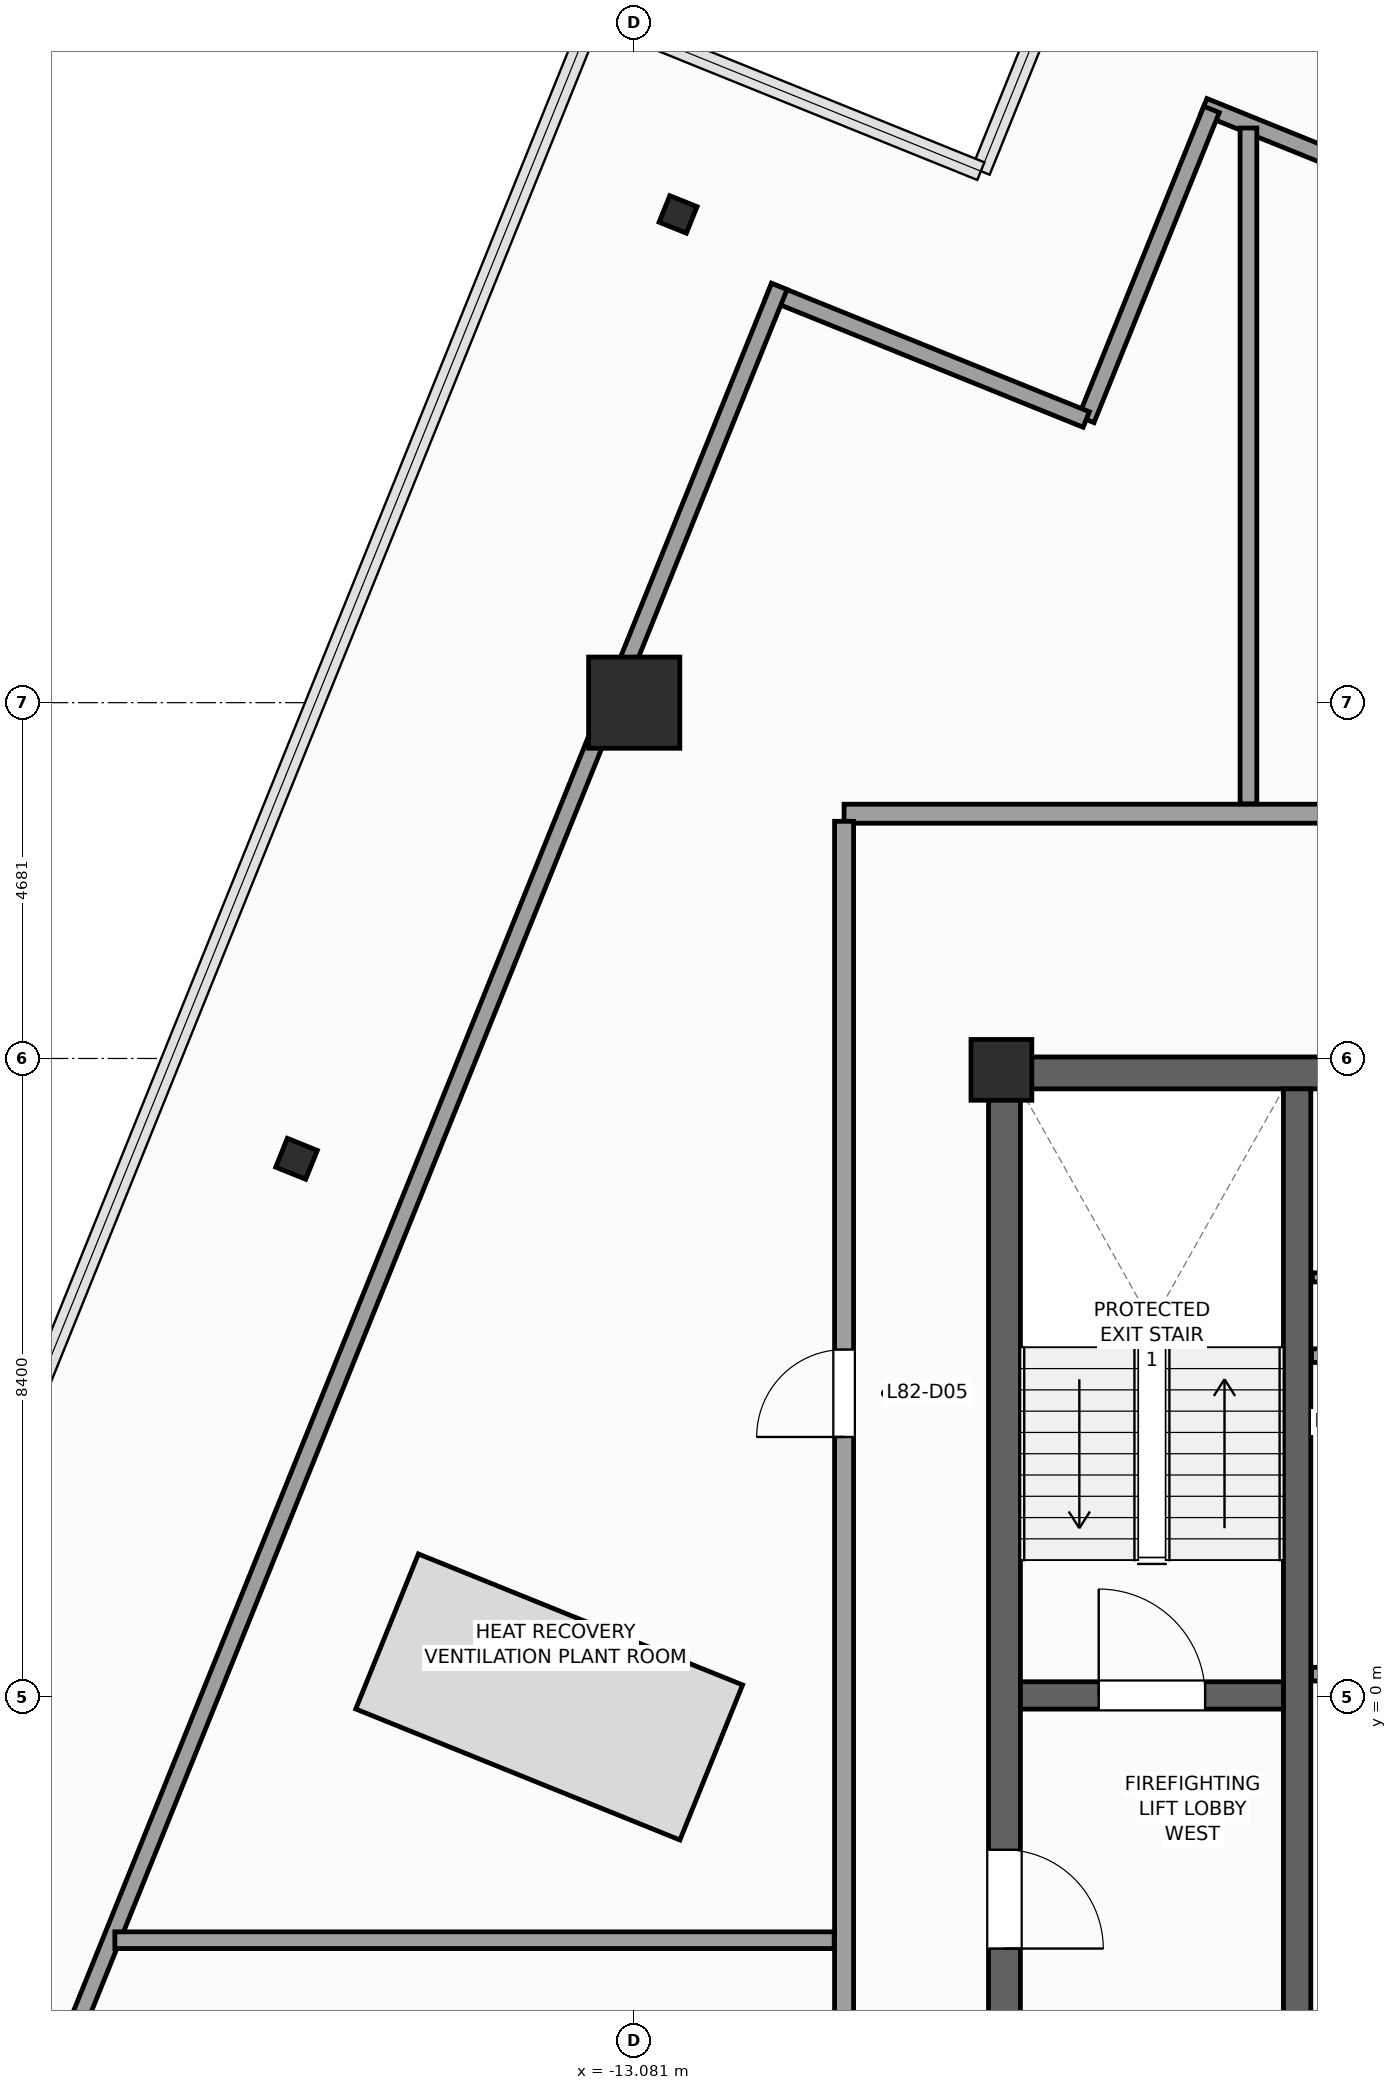
"""IFC4 building model, lengths in metres.
Left out: names, types, materials, properties, quantities, classifications, styles, units other than length and angle.
Written with IfcOpenShell. Run it as: python <this file> out.ifc"""

import sys

from ifc_helpers import new_model, si_unit, direction, frame, frame_2d, origin, origin_2d, place, context, subcontext, project, spatial, rectangle, i_section, extrude, source, transform, mapped, element, fill, save


model = new_model("IFC4")
c1 = context("Model", 3, precision=1e-05, world=origin(), true_north=direction((0.0, 1.0)))
c2 = subcontext(c1, "Body", "Model", "MODEL_VIEW")
j1 = project(units=[si_unit("LENGTHUNIT", "METRE"), si_unit("PLANEANGLEUNIT", "RADIAN")], contexts=[c1])
p1 = place(None, origin())
s1 = spatial("IfcSite", under=j1, at=p1, CompositionType="ELEMENT")
p2 = place(p1, origin())
s2 = spatial("IfcBuilding", under=s1, at=p2, CompositionType="ELEMENT")
p3 = place(p2, frame((0.0, 0.0, 333.6)))
s3 = spatial("IfcBuildingStorey", under=s2, at=p3, CompositionType="ELEMENT", Elevation=333.6)
p4 = place(p3, frame((-8.42, 8.21, 0.0), z_axis=(0.0, 0.0, 1.0), x_axis=(1.0, 0.0, 0.0)))
e1 = element("IfcWall", 1, at=p4, inside=s3, PredefinedType="SHEAR", context=c2, shape_type="SweptSolid", body=[
    extrude(rectangle(XDim=16.84, YDim=0.42, at=frame_2d((8.42, 0.0))), origin(), (0.0, 0.0, 1.0), 4.0),
])
p5 = place(p3, frame((-8.21, -8.0, 0.0), z_axis=(0.0, 0.0, 1.0), x_axis=(0.0, 1.0, 0.0)))
e2 = element("IfcWall", 2, at=p5, inside=s3, PredefinedType="SHEAR", context=c2, shape_type="SweptSolid", body=[
    extrude(rectangle(XDim=16.0, YDim=0.42, at=frame_2d((8.0, 0.0))), origin(), (0.0, 0.0, 1.0), 4.0),
])
p6 = place(p5, frame((4.69, 0.0, 0.0)))
e3 = element("IfcOpeningElement", 3, at=p6, cuts=e2, PredefinedType="OPENING", context=c2, shape_type="SweptSolid", body=[
    extrude(rectangle(XDim=1.3, YDim=2.2, at=frame_2d((0.65, 1.1))), frame((0.0, 0.22, 0.0), z_axis=(0.0, -1.0, 0.0), x_axis=(1.0, 0.0, 0.0)), (0.0, 0.0, 1.0), 0.44),
])
p7 = place(p3, frame((-4.36, -8.0, 0.0), z_axis=(0.0, 0.0, 1.0), x_axis=(0.0, 1.0, 0.0)))
e4 = element("IfcWall", 4, at=p7, inside=s3, PredefinedType="SHEAR", context=c2, shape_type="SweptSolid", body=[
    extrude(rectangle(XDim=16.0, YDim=0.36, at=frame_2d((8.0, 0.0))), origin(), (0.0, 0.0, 1.0), 4.0),
])
p8 = place(p3, frame((-8.0, 0.02, 0.0), z_axis=(0.0, 0.0, 1.0), x_axis=(1.0, 0.0, 0.0)))
e5 = element("IfcWall", 5, at=p8, inside=s3, PredefinedType="SHEAR", context=c2, shape_type="SweptSolid", body=[
    extrude(rectangle(XDim=3.46, YDim=0.36, at=frame_2d((1.73, 0.0))), origin(), (0.0, 0.0, 1.0), 4.0),
])
p9 = place(p8, frame((1.03, 0.0, 0.0)))
e6 = element("IfcOpeningElement", 6, at=p9, cuts=e5, PredefinedType="OPENING", context=c2, shape_type="SweptSolid", body=[
    extrude(rectangle(XDim=1.4, YDim=2.2, at=frame_2d((0.7, 1.1))), frame((0.0, 0.19, 0.0), z_axis=(0.0, -1.0, 0.0), x_axis=(1.0, 0.0, 0.0)), (0.0, 0.0, 1.0), 0.38),
])
m1 = source(origin(), c2, "Body", "SweptSolid", [
    extrude(rectangle(XDim=0.8, YDim=0.8, at=origin_2d()), origin(), (0.0, 0.0, 1.0), 4.0),
])
p10 = place(p3, frame((-8.25, 8.25, 0.0), z_axis=(0.0, 0.0, 1.0), x_axis=(1.0, 0.0, 0.0)))
e7 = element("IfcColumn", 7, at=p10, inside=s3, PredefinedType="PILASTER", context=c2, shape_type="MappedRepresentation", body=[
    mapped(m1, transform((0.0, 0.0, 0.0), scale=1.0)),
])
m2 = source(origin(), c2, "Body", "SweptSolid", [
    extrude(rectangle(XDim=1.2, YDim=1.2, at=origin_2d()), origin(), (0.0, 0.0, 1.0), 4.0),
])
p11 = place(p3, frame((-13.081, 13.081, 0.0), z_axis=(0.0, 0.0, 1.0), x_axis=(1.0, 0.0, 0.0)))
e8 = element("IfcColumn", 8, at=p11, inside=s3, PredefinedType="COLUMN", context=c2, shape_type="MappedRepresentation", body=[
    mapped(m2, transform((0.0, 0.0, 0.0), scale=1.0)),
])
m3 = source(origin(), c2, "Body", "SweptSolid", [
    extrude(i_section(OverallWidth=0.376, OverallDepth=0.387, WebThickness=0.02, FlangeThickness=0.032, FilletRadius=0.015, at=origin_2d()), origin(), (0.0, 0.0, 1.0), 4.0),
])
p12 = place(p3, frame((-12.504, 19.504, 0.0), z_axis=(0.0, 0.0, 1.0), x_axis=(0.374606593416, 0.927183854567, 0.0)))
e9 = element("IfcColumn", 9, at=p12, inside=s3, PredefinedType="COLUMN", context=c2, shape_type="MappedRepresentation", body=[
    mapped(m3, transform((0.0, 0.0, 0.0), scale=1.0)),
])
m4 = source(origin(), c2, "Body", "SweptSolid", [
    extrude(i_section(OverallWidth=0.409, OverallDepth=0.425, WebThickness=0.024, FlangeThickness=0.039, FilletRadius=0.015, at=origin_2d()), origin(), (0.0, 0.0, 1.0), 4.0),
])
p13 = place(p3, frame((-17.524, 7.08, 0.0), z_axis=(0.0, 0.0, 1.0), x_axis=(0.374606593416, 0.927183854567, 0.0)))
e10 = element("IfcColumn", 10, at=p13, inside=s3, PredefinedType="COLUMN", context=c2, shape_type="MappedRepresentation", body=[
    mapped(m4, transform((0.0, 0.0, 0.0), scale=1.0)),
])
for number, where, z_axis, x_axis in (
    (11, (-4.17, 0.3, 0.0), (0.0, 0.0, 1.0), (1.0, 0.0, 0.0)),
    (12, (-4.17, 4.49, 0.0), (0.0, 0.0, 1.0), (1.0, 0.0, 0.0)),
):
    element("IfcWall", number, at=place(p3, frame(where, z_axis=z_axis, x_axis=x_axis)), inside=s3, PredefinedType="PARTITIONING", context=c2, shape_type="SweptSolid", body=[
        extrude(rectangle(XDim=2.28, YDim=0.18, at=frame_2d((1.14, 0.0))), origin(), (0.0, 0.0, 1.0), 3.7),
    ])
p14 = place(p3, frame((-4.16, 5.52, 0.0), z_axis=(0.0, 0.0, 1.0), x_axis=(1.0, 0.0, 0.0)))
e13 = element("IfcWall", 13, at=p14, inside=s3, PredefinedType="PARTITIONING", context=c2, shape_type="SweptSolid", body=[
    extrude(rectangle(XDim=2.1, YDim=0.12, at=frame_2d((1.05, 0.0))), origin(), (0.0, 0.0, 1.0), 3.7),
])
p15 = place(p3, frame((18.556, 11.172, 0.0), z_axis=(0.0, 0.0, 1.0), x_axis=(-0.927181788521, 0.374611707018, 0.0)))
e14 = element("IfcWall", 14, at=p15, inside=s3, PredefinedType="PARTITIONING", context=c2, shape_type="SweptSolid", body=[
    extrude(rectangle(XDim=26.04, YDim=0.22, at=frame_2d((13.02, 0.0))), origin(), (0.0, 0.0, 1.0), 3.05),
])
p16 = place(p3, frame((-5.486, 20.886, 0.0), z_axis=(0.0, 0.0, 1.0), x_axis=(-0.374593321469, -0.927189216671, 0.0)))
e15 = element("IfcWall", 15, at=p16, inside=s3, PredefinedType="PARTITIONING", context=c2, shape_type="SweptSolid", body=[
    extrude(rectangle(XDim=4.4, YDim=0.22, at=frame_2d((2.2, 0.0))), origin(), (0.0, 0.0, 1.0), 3.7),
])
p17 = place(p3, frame((-7.134, 16.806, 0.0), z_axis=(0.0, 0.0, 1.0), x_axis=(-0.927186885331, 0.374599091925, 0.0)))
e16 = element("IfcWall", 16, at=p17, inside=s3, PredefinedType="PARTITIONING", context=c2, shape_type="SweptSolid", body=[
    extrude(rectangle(XDim=4.51, YDim=0.22, at=frame_2d((2.255, 0.0))), origin(), (0.0, 0.0, 1.0), 3.7),
])
p18 = place(p3, frame((-11.172, 18.556, 0.0), z_axis=(0.0, 0.0, 1.0), x_axis=(-0.374611707018, -0.927181788521, 0.0)))
e17 = element("IfcWall", 17, at=p18, inside=s3, PredefinedType="PARTITIONING", context=c2, shape_type="SweptSolid", body=[
    extrude(rectangle(XDim=26.04, YDim=0.22, at=frame_2d((13.02, 0.0))), origin(), (0.0, 0.0, 1.0), 3.05),
])
p19 = place(p3, frame((-10.32, 11.62, 0.0), z_axis=(0.0, 0.0, 1.0), x_axis=(1.0, 0.0, 0.0)))
e18 = element("IfcWall", 18, at=p19, inside=s3, PredefinedType="PARTITIONING", context=c2, shape_type="SweptSolid", body=[
    extrude(rectangle(XDim=21.94, YDim=0.25, at=frame_2d((10.97, 0.0))), origin(), (0.0, 0.0, 1.0), 3.7),
])
p20 = place(p19, frame((9.745, 0.0, 0.0)))
e19 = element("IfcOpeningElement", 19, at=p20, cuts=e18, PredefinedType="OPENING", context=c2, shape_type="SweptSolid", body=[
    extrude(rectangle(XDim=1.15, YDim=2.25, at=frame_2d((0.575, 1.125))), frame((0.0, 0.135, 0.0), z_axis=(0.0, -1.0, 0.0), x_axis=(1.0, 0.0, 0.0)), (0.0, 0.0, 1.0), 0.27),
])
p21 = place(p3, frame((-10.32, -10.22, 0.0), z_axis=(0.0, 0.0, 1.0), x_axis=(0.0, 1.0, 0.0)))
e20 = element("IfcWall", 20, at=p21, inside=s3, PredefinedType="PARTITIONING", context=c2, shape_type="SweptSolid", body=[
    extrude(rectangle(XDim=21.74, YDim=0.25, at=frame_2d((10.87, 0.0))), origin(), (0.0, 0.0, 1.0), 3.7),
])
p22 = place(p21, frame((13.641, 0.0, 0.0)))
e21 = element("IfcOpeningElement", 21, at=p22, cuts=e20, PredefinedType="OPENING", context=c2, shape_type="SweptSolid", body=[
    extrude(rectangle(XDim=1.15, YDim=2.25, at=frame_2d((0.575, 1.125))), frame((0.0, 0.135, 0.0), z_axis=(0.0, -1.0, 0.0), x_axis=(1.0, 0.0, 0.0)), (0.0, 0.0, 1.0), 0.27),
])
p23 = place(p3, frame((-5.0, 11.75, 0.0), z_axis=(0.0, 0.0, 1.0), x_axis=(0.0, 1.0, 0.0)))
e22 = element("IfcWall", 22, at=p23, inside=s3, PredefinedType="PARTITIONING", context=c2, shape_type="SweptSolid", body=[
    extrude(rectangle(XDim=8.891, YDim=0.22, at=frame_2d((4.446, 0.0))), origin(), (0.0, 0.0, 1.0), 3.7),
])
p24 = place(p3, frame((-10.45, -3.2, 0.0), z_axis=(0.0, 0.0, 1.0), x_axis=(-1.0, 0.0, 0.0)))
e23 = element("IfcWall", 23, at=p24, inside=s3, PredefinedType="PARTITIONING", context=c2, shape_type="SweptSolid", body=[
    extrude(rectangle(XDim=9.464, YDim=0.22, at=frame_2d((4.732, 0.0))), origin(), (0.0, 0.0, 1.0), 3.7),
])
m5 = source(origin(), c2, "Body", "SweptSolid", [
    extrude(rectangle(XDim=1.4, YDim=2.2, at=frame_2d((0.7, 1.1))), frame((0.0, 0.025, 0.0), z_axis=(0.0, -1.0, 0.0), x_axis=(1.0, 0.0, 0.0)), (0.0, 0.0, 1.0), 0.05),
])
p25 = place(p9, origin())
e24 = element("IfcDoor", 24, at=p25, inside=s3, OperationType="SINGLE_SWING_LEFT", PredefinedType="DOOR", context=c2, shape_type="MappedRepresentation", body=[
    mapped(m5, transform((0.0, 0.0, 0.0), scale=1.0)),
])
fill(e6, e24)
m6 = source(origin(), c2, "Body", "SweptSolid", [
    extrude(rectangle(XDim=1.3, YDim=2.2, at=frame_2d((0.65, 1.1))), frame((0.0, 0.025, 0.0), z_axis=(0.0, -1.0, 0.0), x_axis=(1.0, 0.0, 0.0)), (0.0, 0.0, 1.0), 0.05),
])
p26 = place(p6, frame((1.3, 0.0, 0.0), z_axis=(0.0, 0.0, 1.0), x_axis=(-1.0, 0.0, 0.0)))
e25 = element("IfcDoor", 25, at=p26, inside=s3, OperationType="SINGLE_SWING_LEFT", PredefinedType="DOOR", context=c2, shape_type="MappedRepresentation", body=[
    mapped(m6, transform((0.0, 0.0, 0.0), scale=1.0)),
])
fill(e3, e25)
m7 = source(origin(), c2, "Body", "SweptSolid", [
    extrude(rectangle(XDim=1.15, YDim=2.25, at=frame_2d((0.575, 1.125))), frame((0.0, 0.025, 0.0), z_axis=(0.0, -1.0, 0.0), x_axis=(1.0, 0.0, 0.0)), (0.0, 0.0, 1.0), 0.05),
])
p27 = place(p22, origin())
e26 = element("IfcDoor", 26, at=p27, inside=s3, OperationType="SINGLE_SWING_LEFT", PredefinedType="DOOR", context=c2, shape_type="MappedRepresentation", body=[
    mapped(m7, transform((0.0, 0.0, 0.0), scale=1.0)),
])
fill(e21, e26)
save(model, sys.argv[1])
